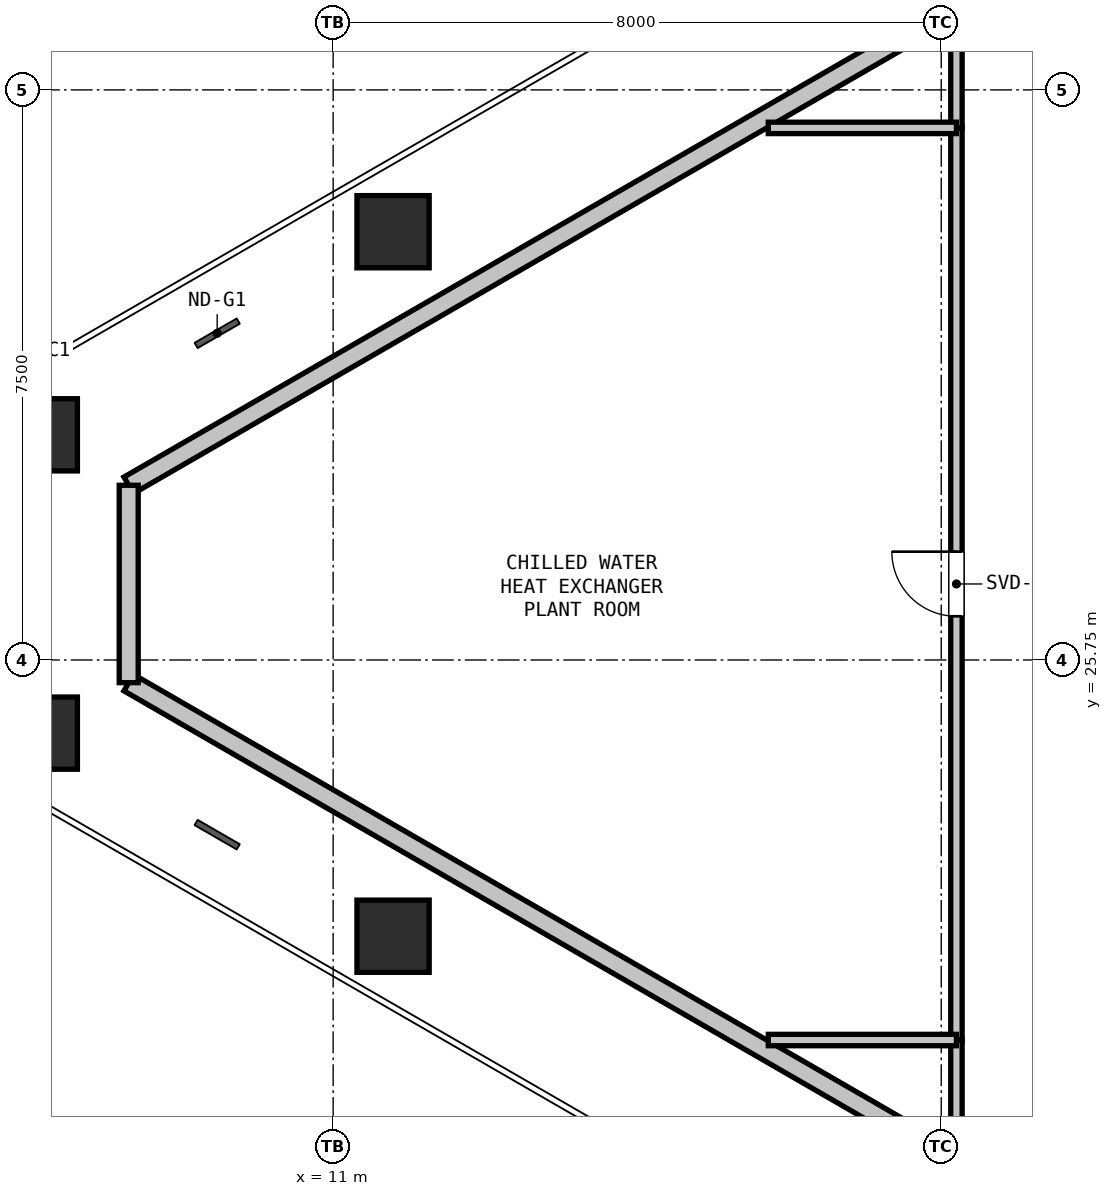
"""IFC4 building model, lengths in metres.
Left out: names, types, materials, properties, quantities, classifications, styles, units other than length and angle.
Written with IfcOpenShell. Run it as: python <this file> out.ifc"""

import sys

from ifc_helpers import new_model, si_unit, direction, frame, frame_2d, origin, origin_2d, place, context, subcontext, project, spatial, rectangle, hollow_rectangle, extrude, element, fill, save


model = new_model("IFC4")
c1 = context("Model", 3, precision=1e-05, world=origin(), true_north=direction((0.0, 1.0)))
c2 = subcontext(c1, "Body", "Model", "MODEL_VIEW")
j1 = project(units=[si_unit("LENGTHUNIT", "METRE"), si_unit("PLANEANGLEUNIT", "RADIAN")], contexts=[c1])
p1 = place(None, origin())
s1 = spatial("IfcSite", under=j1, at=p1, CompositionType="ELEMENT")
p2 = place(p1, origin())
s2 = spatial("IfcBuilding", under=s1, at=p2, CompositionType="ELEMENT")
p3 = place(p2, frame((0.0, 0.0, 160.8)))
s3 = spatial("IfcBuildingStorey", under=s2, at=p3, CompositionType="ELEMENT", Elevation=160.8)
p4 = place(p3, frame((7.16, 28.712, 0.0), z_axis=(0.0, 0.0, 1.0), x_axis=(1.0, 0.0, 0.0)))
e1 = element("IfcColumn", 1, at=p4, inside=s3, PredefinedType="COLUMN", context=c2, shape_type="SweptSolid", body=[
    extrude(hollow_rectangle(XDim=0.95, YDim=0.95, WallThickness=0.028, at=origin_2d()), origin(), (0.0, 0.0, 1.0), 4.77),
])
for number, where, z_axis, x_axis in (
    (2, (11.788, 31.384, 0.0), (0.0, 0.0, 1.0), (1.0, 0.0, 0.0)),
    (3, (11.788, 22.116, 0.0), (0.0, 0.0, 1.0), (1.0, 0.0, 0.0)),
    (4, (7.16, 24.788, 0.0), (0.0, 0.0, 1.0), (1.0, 0.0, 0.0)),
):
    element("IfcColumn", number, at=place(p3, frame(where, z_axis=z_axis, x_axis=x_axis)), inside=s3, PredefinedType="COLUMN", context=c2, shape_type="SweptSolid", body=[
        extrude(hollow_rectangle(XDim=0.95, YDim=0.95, WallThickness=0.028, at=origin_2d()), origin(), (0.0, 0.0, 1.0), 5.02),
    ])
p5 = place(p3, frame((8.31, 28.048, 0.0), z_axis=(0.0, 0.0, 1.0), x_axis=(0.866026432802, 0.499998217685, 0.0)))
e5 = element("IfcWall", 5, at=p5, inside=s3, PredefinedType="SOLIDWALL", context=c2, shape_type="SweptSolid", body=[
    extrude(rectangle(XDim=34.537, YDim=0.25, at=frame_2d((17.269, 0.0))), origin(), (0.0, 0.0, 1.0), 4.755),
])
p6 = place(p3, frame((38.22, 8.183, 0.0), z_axis=(0.0, 0.0, 1.0), x_axis=(-0.866026432802, 0.499998217685, 0.0)))
e6 = element("IfcWall", 6, at=p6, inside=s3, PredefinedType="SOLIDWALL", context=c2, shape_type="SweptSolid", body=[
    extrude(rectangle(XDim=34.537, YDim=0.25, at=frame_2d((17.269, 0.0))), origin(), (0.0, 0.0, 1.0), 5.005),
])
p7 = place(p3, frame((8.31, 25.452, 0.0), z_axis=(0.0, 0.0, 1.0), x_axis=(0.0, 1.0, 0.0)))
e7 = element("IfcWall", 7, at=p7, inside=s3, PredefinedType="SOLIDWALL", context=c2, shape_type="SweptSolid", body=[
    extrude(rectangle(XDim=2.597, YDim=0.25, at=frame_2d((1.298, 0.0))), origin(), (0.0, 0.0, 1.0), 4.755),
])
p8 = place(p3, frame((19.2, 19.337, 0.0), z_axis=(0.0, 0.0, 1.0), x_axis=(0.0, 1.0, 0.0)))
e8 = element("IfcWall", 8, at=p8, inside=s3, PredefinedType="PARTITIONING", context=c2, shape_type="SweptSolid", body=[
    extrude(rectangle(XDim=1.413, YDim=0.15, at=frame_2d((0.707, 0.0))), origin(), (0.0, 0.0, 1.0), 6.37),
])
p9 = place(p3, frame((19.2, 20.75, 0.0), z_axis=(0.0, 0.0, 1.0), x_axis=(0.0, 1.0, 0.0)))
e9 = element("IfcWall", 9, at=p9, inside=s3, PredefinedType="PARTITIONING", context=c2, shape_type="SweptSolid", body=[
    extrude(rectangle(XDim=12.0, YDim=0.15, at=frame_2d((6.0, 0.0))), origin(), (0.0, 0.0, 1.0), 4.755),
])
p10 = place(p9, frame((5.575, 0.0, 0.0)))
e10 = element("IfcOpeningElement", 10, at=p10, cuts=e9, PredefinedType="OPENING", context=c2, shape_type="SweptSolid", body=[
    extrude(rectangle(XDim=0.85, YDim=2.1, at=frame_2d((0.425, 1.05))), frame((0.0, 0.085, 0.0), z_axis=(0.0, -1.0, 0.0), x_axis=(1.0, 0.0, 0.0)), (0.0, 0.0, 1.0), 0.17),
])
p11 = place(p3, frame((19.2, 32.75, 0.0), z_axis=(0.0, 0.0, 1.0), x_axis=(0.0, 1.0, 0.0)))
e11 = element("IfcWall", 11, at=p11, inside=s3, PredefinedType="PARTITIONING", context=c2, shape_type="SweptSolid", body=[
    extrude(rectangle(XDim=1.413, YDim=0.15, at=frame_2d((0.707, 0.0))), origin(), (0.0, 0.0, 1.0), 6.37),
])
for number, where, z_axis, x_axis in (
    (12, (16.725, 32.75, 0.0), (0.0, 0.0, 1.0), (1.0, 0.0, 0.0)),
    (13, (19.2, 20.75, 0.0), (0.0, 0.0, 1.0), (-1.0, 0.0, 0.0)),
):
    element("IfcWall", number, at=place(p3, frame(where, z_axis=z_axis, x_axis=x_axis)), inside=s3, PredefinedType="PARTITIONING", context=c2, shape_type="SweptSolid", body=[
        extrude(rectangle(XDim=2.475, YDim=0.15, at=frame_2d((1.238, 0.0))), origin(), (0.0, 0.0, 1.0), 6.37),
    ])
p12 = place(p10, origin())
e14 = element("IfcDoor", 14, at=p12, inside=s3, OperationType="SINGLE_SWING_RIGHT", PredefinedType="DOOR", context=c2, shape_type="SweptSolid", body=[
    extrude(rectangle(XDim=0.85, YDim=2.1, at=frame_2d((0.425, 1.05))), frame((0.0, 0.025, 0.0), z_axis=(0.0, -1.0, 0.0), x_axis=(1.0, 0.0, 0.0)), (0.0, 0.0, 1.0), 0.05),
])
fill(e10, e14)
save(model, sys.argv[1])
